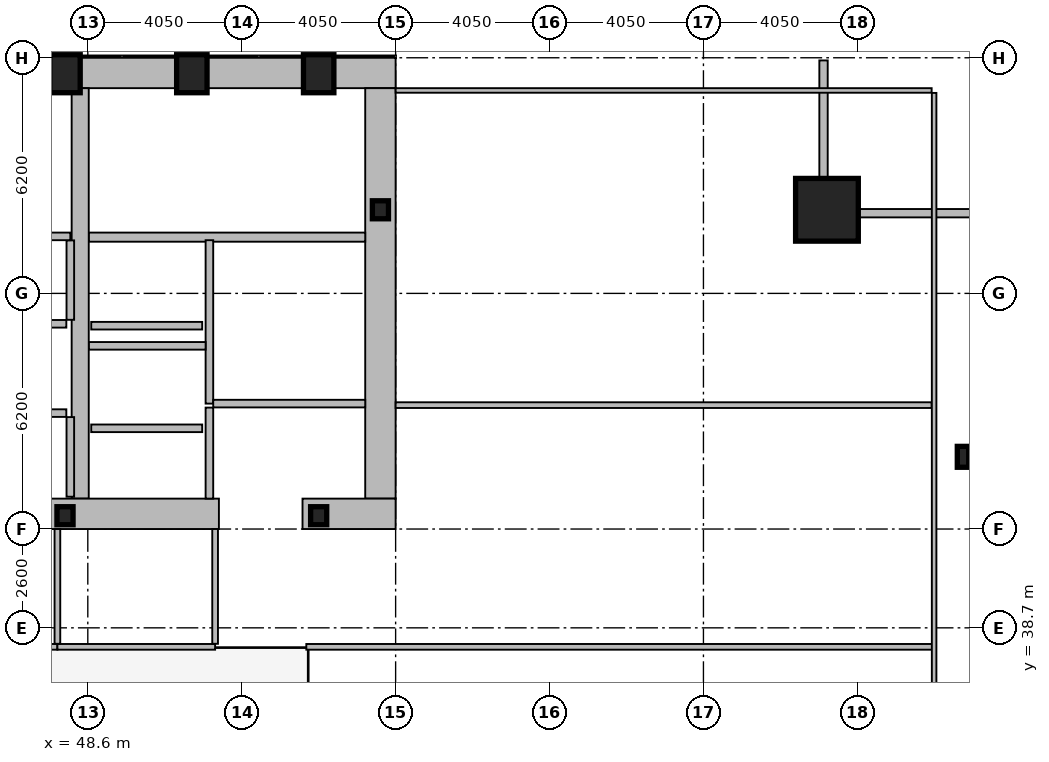
"""IFC4 building model, lengths in metres.
Left out: names, types, materials, properties, quantities, classifications, styles, units other than length and angle.
Written with IfcOpenShell. Run it as: python <this file> out.ifc"""

import sys

from ifc_helpers import new_model, si_unit, direction, frame, frame_2d, origin, origin_2d, place, context, subcontext, project, spatial, rectangle, hollow_rectangle, i_section, extrude, element, fill, save


model = new_model("IFC4")
c1 = context("Model", 3, precision=1e-05, world=origin(), true_north=direction((0.0, 1.0)))
c2 = subcontext(c1, "Body", "Model", "MODEL_VIEW")
j1 = project(units=[si_unit("LENGTHUNIT", "METRE"), si_unit("PLANEANGLEUNIT", "RADIAN")], contexts=[c1])
p1 = place(None, origin())
s1 = spatial("IfcSite", under=j1, at=p1, CompositionType="ELEMENT")
p2 = place(p1, origin())
s2 = spatial("IfcBuilding", under=s1, at=p2, CompositionType="ELEMENT")
p3 = place(p2, frame((0.0, 0.0, 61.8)))
s3 = spatial("IfcBuildingStorey", under=s2, at=p3, CompositionType="ELEMENT", Elevation=61.8)
p4 = place(p3, frame((16.2, 53.3, 0.0), z_axis=(0.0, 0.0, 1.0), x_axis=(1.0, 0.0, 0.0)))
e1 = element("IfcWall", 1, at=p4, inside=s3, PredefinedType="SHEAR", context=c2, shape_type="SweptSolid", body=[
    extrude(rectangle(XDim=40.5, YDim=0.8, at=frame_2d((20.25, 0.0))), origin(), (0.0, 0.0, 1.0), 3.82),
])
p5 = place(p3, frame((56.3, 52.9, 0.0), z_axis=(0.0, 0.0, 1.0), x_axis=(0.0, -1.0, 0.0)))
e2 = element("IfcWall", 2, at=p5, inside=s3, PredefinedType="SHEAR", context=c2, shape_type="SweptSolid", body=[
    extrude(rectangle(XDim=10.8, YDim=0.8, at=frame_2d((5.4, 0.0))), origin(), (0.0, 0.0, 1.0), 3.82),
])
p6 = place(p3, frame((48.4, 42.1, 0.0), z_axis=(0.0, 0.0, 1.0), x_axis=(0.0, 1.0, 0.0)))
e3 = element("IfcWall", 3, at=p6, inside=s3, PredefinedType="SHEAR", context=c2, shape_type="SweptSolid", body=[
    extrude(rectangle(XDim=10.8, YDim=0.45, at=frame_2d((5.4, 0.0))), origin(), (0.0, 0.0, 1.0), 3.82),
])
p7 = place(p3, frame((52.05, 41.7, 0.0), z_axis=(0.0, 0.0, 1.0), x_axis=(-1.0, 0.0, 0.0)))
e4 = element("IfcWall", 4, at=p7, inside=s3, PredefinedType="SHEAR", context=c2, shape_type="SweptSolid", body=[
    extrude(rectangle(XDim=11.3, YDim=0.8, at=frame_2d((5.65, 0.0))), origin(), (0.0, 0.0, 1.0), 3.82),
])
p8 = place(p3, frame((56.7, 41.7, 0.0), z_axis=(0.0, 0.0, 1.0), x_axis=(-1.0, 0.0, 0.0)))
e5 = element("IfcWall", 5, at=p8, inside=s3, PredefinedType="SHEAR", context=c2, shape_type="SweptSolid", body=[
    extrude(rectangle(XDim=2.45, YDim=0.8, at=frame_2d((1.225, 0.0))), origin(), (0.0, 0.0, 1.0), 3.82),
])
p9 = place(p3, frame((48.63, 48.98, 0.0), z_axis=(0.0, 0.0, 1.0), x_axis=(1.0, 0.0, 0.0)))
e6 = element("IfcWall", 6, at=p9, inside=s3, PredefinedType="SHEAR", context=c2, shape_type="SweptSolid", body=[
    extrude(rectangle(XDim=7.27, YDim=0.24, at=frame_2d((3.635, 0.0))), origin(), (0.0, 0.0, 1.0), 3.82),
])
p10 = place(p9, frame((6.0, 0.0, 0.0)))
e7 = element("IfcOpeningElement", 7, at=p10, cuts=e6, PredefinedType="OPENING", context=c2, shape_type="SweptSolid", body=[
    extrude(rectangle(XDim=1.05, YDim=2.15, at=frame_2d((0.525, 1.075))), frame((0.0, 0.13, 0.0), z_axis=(0.0, -1.0, 0.0), x_axis=(1.0, 0.0, 0.0)), (0.0, 0.0, 1.0), 0.26),
])
p11 = place(p3, frame((68.05, 49.7, 0.0), z_axis=(0.0, 0.0, 1.0), x_axis=(1.0, 0.0, 0.0)))
e8 = element("IfcColumn", 8, at=p11, inside=s3, PredefinedType="COLUMN", context=c2, shape_type="SweptSolid", body=[
    extrude(hollow_rectangle(XDim=1.65, YDim=1.65, WallThickness=0.075, at=origin_2d()), origin(), (0.0, 0.0, 1.0), 4.0),
])
for number, where, z_axis, x_axis in (
    (9, (48.0, 53.28, 0.0), (0.0, 0.0, 1.0), (1.0, 0.0, 0.0)),
    (10, (51.337, 53.28, 0.0), (0.0, 0.0, 1.0), (1.0, 0.0, 0.0)),
    (11, (54.675, 53.28, 0.0), (0.0, 0.0, 1.0), (1.0, 0.0, 0.0)),
):
    element("IfcColumn", number, at=place(p3, frame(where, z_axis=z_axis, x_axis=x_axis)), inside=s3, PredefinedType="COLUMN", context=c2, shape_type="SweptSolid", body=[
        extrude(hollow_rectangle(XDim=0.8, YDim=1.0, WallThickness=0.055, at=origin_2d()), origin(), (0.0, 0.0, 1.0), 4.0),
    ])
p12 = place(p3, frame((71.63, 43.2, 0.0), z_axis=(0.0, 0.0, 1.0), x_axis=(1.0, 0.0, 0.0)))
e12 = element("IfcColumn", 12, at=p12, inside=s3, PredefinedType="COLUMN", context=c2, shape_type="SweptSolid", body=[
    extrude(i_section(OverallWidth=0.3, OverallDepth=0.55, WebThickness=0.015, FlangeThickness=0.029, at=origin_2d()), origin(), (0.0, 0.0, 1.0), 4.0),
])
for number, where, z_axis, x_axis in (
    (13, (56.3, 49.7, 0.0), (0.0, 0.0, 1.0), (1.0, 0.0, 0.0)),
    (14, (48.0, 41.65, 0.0), (0.0, 0.0, 1.0), (1.0, 0.0, 0.0)),
    (15, (54.675, 41.65, 0.0), (0.0, 0.0, 1.0), (1.0, 0.0, 0.0)),
):
    element("IfcColumn", number, at=place(p3, frame(where, z_axis=z_axis, x_axis=x_axis)), inside=s3, PredefinedType="COLUMN", context=c2, shape_type="SweptSolid", body=[
        extrude(i_section(OverallWidth=0.424, OverallDepth=0.474, WebThickness=0.048, FlangeThickness=0.077, at=origin_2d()), origin(), (0.0, 0.0, 1.0), 4.0),
    ])
p13 = place(p3, frame((67.96, 53.63, 0.0), z_axis=(0.0, 0.0, 1.0), x_axis=(0.0, -1.0, 0.0)))
e16 = element("IfcWall", 16, at=p13, inside=s3, PredefinedType="SOLIDWALL", context=c2, shape_type="SweptSolid", body=[
    extrude(rectangle(XDim=3.91, YDim=0.22, at=frame_2d((1.955, 0.0))), origin(), (0.0, 0.0, 1.0), 3.16),
])
p14 = place(p3, frame((67.85, 49.61, 0.0), z_axis=(0.0, 0.0, 1.0), x_axis=(1.0, 0.0, 0.0)))
e17 = element("IfcWall", 17, at=p14, inside=s3, PredefinedType="SOLIDWALL", context=c2, shape_type="SweptSolid", body=[
    extrude(rectangle(XDim=4.22, YDim=0.22, at=frame_2d((2.11, 0.0))), origin(), (0.0, 0.0, 1.0), 3.16),
])
p15 = place(p3, frame((51.61, 43.95, 0.0), z_axis=(0.0, 0.0, 1.0), x_axis=(-1.0, 0.0, 0.0)))
e18 = element("IfcWall", 18, at=p15, inside=s3, PredefinedType="PARTITIONING", context=c2, shape_type="SweptSolid", body=[
    extrude(rectangle(XDim=2.92, YDim=0.2, at=frame_2d((1.46, 0.0))), origin(), (0.0, 0.0, 1.0), 3.82),
])
p16 = place(p15, frame((0.81, 0.0, 0.0)))
e19 = element("IfcOpeningElement", 19, at=p16, cuts=e18, PredefinedType="OPENING", context=c2, shape_type="SweptSolid", body=[
    extrude(rectangle(XDim=1.3, YDim=2.18, at=frame_2d((0.65, 1.09))), frame((0.0, 0.11, 0.0), z_axis=(0.0, -1.0, 0.0), x_axis=(1.0, 0.0, 0.0)), (0.0, 0.0, 1.0), 0.22),
])
p17 = place(p3, frame((51.61, 46.65, 0.0), z_axis=(0.0, 0.0, 1.0), x_axis=(-1.0, 0.0, 0.0)))
e20 = element("IfcWall", 20, at=p17, inside=s3, PredefinedType="PARTITIONING", context=c2, shape_type="SweptSolid", body=[
    extrude(rectangle(XDim=2.92, YDim=0.2, at=frame_2d((1.46, 0.0))), origin(), (0.0, 0.0, 1.0), 3.82),
])
p18 = place(p17, frame((0.86, 0.0, 0.0)))
e21 = element("IfcOpeningElement", 21, at=p18, cuts=e20, PredefinedType="OPENING", context=c2, shape_type="SweptSolid", body=[
    extrude(rectangle(XDim=1.2, YDim=2.18, at=frame_2d((0.6, 1.09))), frame((0.0, 0.11, 0.0), z_axis=(0.0, -1.0, 0.0), x_axis=(1.0, 0.0, 0.0)), (0.0, 0.0, 1.0), 0.22),
])
p19 = place(p3, frame((51.8, 44.6, 0.0), z_axis=(0.0, 0.0, 1.0), x_axis=(0.0, 1.0, 0.0)))
e22 = element("IfcWall", 22, at=p19, inside=s3, PredefinedType="PARTITIONING", context=c2, shape_type="SweptSolid", body=[
    extrude(rectangle(XDim=4.3, YDim=0.2, at=frame_2d((2.15, 0.0))), origin(), (0.0, 0.0, 1.0), 3.82),
])
p20 = place(p3, frame((51.9, 44.6, 0.0), z_axis=(0.0, 0.0, 1.0), x_axis=(1.0, 0.0, 0.0)))
e23 = element("IfcWall", 23, at=p20, inside=s3, PredefinedType="PARTITIONING", context=c2, shape_type="SweptSolid", body=[
    extrude(rectangle(XDim=4.0, YDim=0.2, at=frame_2d((2.0, 0.0))), origin(), (0.0, 0.0, 1.0), 3.82),
])
p21 = place(p20, frame((1.15, 0.0, 0.0)))
e24 = element("IfcOpeningElement", 24, at=p21, cuts=e23, PredefinedType="OPENING", context=c2, shape_type="SweptSolid", body=[
    extrude(rectangle(XDim=1.05, YDim=2.15, at=frame_2d((0.525, 1.075))), frame((0.0, 0.11, 0.0), z_axis=(0.0, -1.0, 0.0), x_axis=(1.0, 0.0, 0.0)), (0.0, 0.0, 1.0), 0.22),
])
p22 = place(p3, frame((48.63, 46.12, 0.0), z_axis=(0.0, 0.0, 1.0), x_axis=(1.0, 0.0, 0.0)))
e25 = element("IfcWall", 25, at=p22, inside=s3, PredefinedType="PARTITIONING", context=c2, shape_type="SweptSolid", body=[
    extrude(rectangle(XDim=3.07, YDim=0.2, at=frame_2d((1.535, 0.0))), origin(), (0.0, 0.0, 1.0), 3.82),
])
p23 = place(p3, frame((51.8, 42.1, 0.0), z_axis=(0.0, 0.0, 1.0), x_axis=(0.0, 1.0, 0.0)))
e26 = element("IfcWall", 26, at=p23, inside=s3, PredefinedType="PARTITIONING", context=c2, shape_type="SweptSolid", body=[
    extrude(rectangle(XDim=2.395, YDim=0.2, at=frame_2d((1.198, 0.0))), origin(), (0.0, 0.0, 1.0), 3.82),
])
p24 = place(p23, frame((0.38, 0.0, 0.0)))
e27 = element("IfcOpeningElement", 27, at=p24, cuts=e26, PredefinedType="OPENING", context=c2, shape_type="SweptSolid", body=[
    extrude(rectangle(XDim=1.05, YDim=2.15, at=frame_2d((0.525, 1.075))), frame((0.0, 0.11, 0.0), z_axis=(0.0, -1.0, 0.0), x_axis=(1.0, 0.0, 0.0)), (0.0, 0.0, 1.0), 0.22),
])
p25 = place(p3, frame((41.825, 46.7, 0.0), z_axis=(0.0, 0.0, 1.0), x_axis=(1.0, 0.0, 0.0)))
e28 = element("IfcWall", 28, at=p25, inside=s3, PredefinedType="PARTITIONING", context=c2, shape_type="SweptSolid", body=[
    extrude(rectangle(XDim=6.21, YDim=0.2, at=frame_2d((3.105, 0.0))), origin(), (0.0, 0.0, 1.0), 3.82),
])
p26 = place(p3, frame((48.14, 46.805, 0.0), z_axis=(0.0, 0.0, 1.0), x_axis=(0.0, 1.0, 0.0)))
e29 = element("IfcWall", 29, at=p26, inside=s3, PredefinedType="PARTITIONING", context=c2, shape_type="SweptSolid", body=[
    extrude(rectangle(XDim=2.09, YDim=0.2, at=frame_2d((1.045, 0.0))), origin(), (0.0, 0.0, 1.0), 3.82),
])
p27 = place(p3, frame((41.825, 44.35, 0.0), z_axis=(0.0, 0.0, 1.0), x_axis=(1.0, 0.0, 0.0)))
e30 = element("IfcWall", 30, at=p27, inside=s3, PredefinedType="PARTITIONING", context=c2, shape_type="SweptSolid", body=[
    extrude(rectangle(XDim=6.21, YDim=0.2, at=frame_2d((3.105, 0.0))), origin(), (0.0, 0.0, 1.0), 3.82),
])
p28 = place(p3, frame((48.14, 42.15, 0.0), z_axis=(0.0, 0.0, 1.0), x_axis=(0.0, 1.0, 0.0)))
e31 = element("IfcWall", 31, at=p28, inside=s3, PredefinedType="PARTITIONING", context=c2, shape_type="SweptSolid", body=[
    extrude(rectangle(XDim=2.095, YDim=0.2, at=frame_2d((1.048, 0.0))), origin(), (0.0, 0.0, 1.0), 3.82),
])
p29 = place(p3, frame((40.58, 52.86, 0.0), z_axis=(0.0, 0.0, 1.0), x_axis=(1.0, 0.0, 0.0)))
e32 = element("IfcWall", 32, at=p29, inside=s3, PredefinedType="PARTITIONING", context=c2, shape_type="SweptSolid", body=[
    extrude(rectangle(XDim=7.56, YDim=0.12, at=frame_2d((3.78, 0.0))), origin(), (0.0, 0.0, 1.0), 3.82),
])
p30 = place(p3, frame((40.58, 49.0, 0.0), z_axis=(0.0, 0.0, 1.0), x_axis=(1.0, 0.0, 0.0)))
e33 = element("IfcWall", 33, at=p30, inside=s3, PredefinedType="PARTITIONING", context=c2, shape_type="SweptSolid", body=[
    extrude(rectangle(XDim=7.56, YDim=0.2, at=frame_2d((3.78, 0.0))), origin(), (0.0, 0.0, 1.0), 3.82),
])
p31 = place(p30, frame((0.16, 0.0, 0.0)))
e34 = element("IfcOpeningElement", 34, at=p31, cuts=e33, PredefinedType="OPENING", context=c2, shape_type="SweptSolid", body=[
    extrude(rectangle(XDim=0.95, YDim=2.1, at=frame_2d((0.475, 1.05))), frame((0.0, 0.11, 0.0), z_axis=(0.0, -1.0, 0.0), x_axis=(1.0, 0.0, 0.0)), (0.0, 0.0, 1.0), 0.22),
])
p32 = place(p3, frame((40.88, 38.2, 0.0), z_axis=(0.0, 0.0, 1.0), x_axis=(1.0, 0.0, 0.0)))
e35 = element("IfcWall", 35, at=p32, inside=s3, PredefinedType="PARTITIONING", context=c2, shape_type="SweptSolid", body=[
    extrude(rectangle(XDim=6.92, YDim=0.15, at=frame_2d((3.46, 0.0))), origin(), (0.0, 0.0, 1.0), 3.01),
])
p33 = place(p32, frame((1.1, 0.0, 0.0)))
e36 = element("IfcOpeningElement", 36, at=p33, cuts=e35, PredefinedType="OPENING", context=c2, shape_type="SweptSolid", body=[
    extrude(rectangle(XDim=0.9, YDim=2.05, at=frame_2d((0.45, 1.025))), frame((0.0, 0.085, 0.0), z_axis=(0.0, -1.0, 0.0), x_axis=(1.0, 0.0, 0.0)), (0.0, 0.0, 1.0), 0.17),
])
p34 = place(p3, frame((47.8, 38.2, 0.0), z_axis=(0.0, 0.0, 1.0), x_axis=(1.0, 0.0, 0.0)))
e37 = element("IfcWall", 37, at=p34, inside=s3, PredefinedType="PARTITIONING", context=c2, shape_type="SweptSolid", body=[
    extrude(rectangle(XDim=4.15, YDim=0.15, at=frame_2d((2.075, 0.0))), origin(), (0.0, 0.0, 1.0), 3.01),
])
p35 = place(p34, frame((1.1, 0.0, 0.0)))
e38 = element("IfcOpeningElement", 38, at=p35, cuts=e37, PredefinedType="OPENING", context=c2, shape_type="SweptSolid", body=[
    extrude(rectangle(XDim=1.0, YDim=2.05, at=frame_2d((0.5, 1.025))), frame((0.0, 0.085, 0.0), z_axis=(0.0, -1.0, 0.0), x_axis=(1.0, 0.0, 0.0)), (0.0, 0.0, 1.0), 0.17),
])
p36 = place(p3, frame((47.8, 38.28, 0.0), z_axis=(0.0, 0.0, 1.0), x_axis=(0.0, 1.0, 0.0)))
e39 = element("IfcWall", 39, at=p36, inside=s3, PredefinedType="PARTITIONING", context=c2, shape_type="SweptSolid", body=[
    extrude(rectangle(XDim=3.02, YDim=0.15, at=frame_2d((1.51, 0.0))), origin(), (0.0, 0.0, 1.0), 3.01),
])
p37 = place(p3, frame((51.95, 38.28, 0.0), z_axis=(0.0, 0.0, 1.0), x_axis=(0.0, 1.0, 0.0)))
e40 = element("IfcWall", 40, at=p37, inside=s3, PredefinedType="PARTITIONING", context=c2, shape_type="SweptSolid", body=[
    extrude(rectangle(XDim=3.02, YDim=0.15, at=frame_2d((1.51, 0.0))), origin(), (0.0, 0.0, 1.0), 3.82),
])
p38 = place(p3, frame((54.35, 38.2, 0.0), z_axis=(0.0, 0.0, 1.0), x_axis=(1.0, 0.0, 0.0)))
e41 = element("IfcWall", 41, at=p38, inside=s3, PredefinedType="PARTITIONING", context=c2, shape_type="SweptSolid", body=[
    extrude(rectangle(XDim=16.52, YDim=0.15, at=frame_2d((8.26, 0.0))), origin(), (0.0, 0.0, 1.0), 3.01),
])
p39 = place(p38, frame((3.25, 0.0, 0.0)))
e42 = element("IfcOpeningElement", 42, at=p39, cuts=e41, PredefinedType="OPENING", context=c2, shape_type="SweptSolid", body=[
    extrude(rectangle(XDim=0.95, YDim=2.05, at=frame_2d((0.475, 1.025))), frame((0.0, 0.085, 0.0), z_axis=(0.0, -1.0, 0.0), x_axis=(1.0, 0.0, 0.0)), (0.0, 0.0, 1.0), 0.17),
])
p40 = place(p3, frame((56.7, 44.56, 0.0), z_axis=(0.0, 0.0, 1.0), x_axis=(1.0, 0.0, 0.0)))
e43 = element("IfcWall", 43, at=p40, inside=s3, PredefinedType="PARTITIONING", context=c2, shape_type="SweptSolid", body=[
    extrude(rectangle(XDim=14.105, YDim=0.15, at=frame_2d((7.052, 0.0))), origin(), (0.0, 0.0, 1.0), 3.16),
])
p41 = place(p40, frame((0.9, 0.0, 0.0)))
e44 = element("IfcOpeningElement", 44, at=p41, cuts=e43, PredefinedType="OPENING", context=c2, shape_type="SweptSolid", body=[
    extrude(rectangle(XDim=0.9, YDim=2.05, at=frame_2d((0.45, 1.025))), frame((0.0, 0.085, 0.0), z_axis=(0.0, -1.0, 0.0), x_axis=(1.0, 0.0, 0.0)), (0.0, 0.0, 1.0), 0.17),
])
p42 = place(p3, frame((70.87, 10.665, 0.0), z_axis=(0.0, 0.0, 1.0), x_axis=(0.0, 1.0, 0.0)))
e45 = element("IfcWall", 45, at=p42, inside=s3, PredefinedType="PARTITIONING", context=c2, shape_type="SweptSolid", body=[
    extrude(rectangle(XDim=42.11, YDim=0.12, at=frame_2d((21.055, 0.0))), origin(), (0.0, 0.0, 1.0), 3.01),
])
p43 = place(p3, frame((56.7, 52.84, 0.0), z_axis=(0.0, 0.0, 1.0), x_axis=(1.0, 0.0, 0.0)))
e46 = element("IfcWall", 46, at=p43, inside=s3, PredefinedType="PARTITIONING", context=c2, shape_type="SweptSolid", body=[
    extrude(rectangle(XDim=14.105, YDim=0.12, at=frame_2d((7.052, 0.0))), origin(), (0.0, 0.0, 1.0), 3.82),
])
p44 = place(p10, origin())
e47 = element("IfcDoor", 47, at=p44, inside=s3, OperationType="SINGLE_SWING_RIGHT", PredefinedType="DOOR", context=c2, shape_type="SweptSolid", body=[
    extrude(rectangle(XDim=1.05, YDim=2.15, at=frame_2d((0.525, 1.075))), frame((0.0, 0.025, 0.0), z_axis=(0.0, -1.0, 0.0), x_axis=(1.0, 0.0, 0.0)), (0.0, 0.0, 1.0), 0.05),
])
fill(e7, e47)
p45 = place(p16, origin())
e48 = element("IfcDoor", 48, at=p45, inside=s3, OperationType="SLIDING_TO_LEFT", PredefinedType="DOOR", context=c2, shape_type="SweptSolid", body=[
    extrude(rectangle(XDim=1.3, YDim=2.18, at=frame_2d((0.65, 1.09))), frame((0.0, 0.025, 0.0), z_axis=(0.0, -1.0, 0.0), x_axis=(1.0, 0.0, 0.0)), (0.0, 0.0, 1.0), 0.05),
])
fill(e19, e48)
p46 = place(p18, origin())
e49 = element("IfcDoor", 49, at=p46, inside=s3, OperationType="SLIDING_TO_LEFT", PredefinedType="DOOR", context=c2, shape_type="SweptSolid", body=[
    extrude(rectangle(XDim=1.2, YDim=2.18, at=frame_2d((0.6, 1.09))), frame((0.0, 0.025, 0.0), z_axis=(0.0, -1.0, 0.0), x_axis=(1.0, 0.0, 0.0)), (0.0, 0.0, 1.0), 0.05),
])
fill(e21, e49)
p47 = place(p21, origin())
e50 = element("IfcDoor", 50, at=p47, inside=s3, OperationType="SINGLE_SWING_RIGHT", PredefinedType="DOOR", context=c2, shape_type="SweptSolid", body=[
    extrude(rectangle(XDim=1.05, YDim=2.15, at=frame_2d((0.525, 1.075))), frame((0.0, 0.025, 0.0), z_axis=(0.0, -1.0, 0.0), x_axis=(1.0, 0.0, 0.0)), (0.0, 0.0, 1.0), 0.05),
])
fill(e24, e50)
p48 = place(p24, origin())
e51 = element("IfcDoor", 51, at=p48, inside=s3, OperationType="SINGLE_SWING_LEFT", PredefinedType="DOOR", context=c2, shape_type="SweptSolid", body=[
    extrude(rectangle(XDim=1.05, YDim=2.15, at=frame_2d((0.525, 1.075))), frame((0.0, 0.025, 0.0), z_axis=(0.0, -1.0, 0.0), x_axis=(1.0, 0.0, 0.0)), (0.0, 0.0, 1.0), 0.05),
])
fill(e27, e51)
p49 = place(p35, origin())
e52 = element("IfcDoor", 52, at=p49, inside=s3, OperationType="SINGLE_SWING_RIGHT", PredefinedType="DOOR", context=c2, shape_type="SweptSolid", body=[
    extrude(rectangle(XDim=1.0, YDim=2.05, at=frame_2d((0.5, 1.025))), frame((0.0, 0.025, 0.0), z_axis=(0.0, -1.0, 0.0), x_axis=(1.0, 0.0, 0.0)), (0.0, 0.0, 1.0), 0.05),
])
fill(e38, e52)
p50 = place(p39, origin())
e53 = element("IfcDoor", 53, at=p50, inside=s3, OperationType="SINGLE_SWING_RIGHT", PredefinedType="DOOR", context=c2, shape_type="SweptSolid", body=[
    extrude(rectangle(XDim=0.95, YDim=2.05, at=frame_2d((0.475, 1.025))), frame((0.0, 0.025, 0.0), z_axis=(0.0, -1.0, 0.0), x_axis=(1.0, 0.0, 0.0)), (0.0, 0.0, 1.0), 0.05),
])
fill(e42, e53)
p51 = place(p41, origin())
e54 = element("IfcDoor", 54, at=p51, inside=s3, OperationType="SINGLE_SWING_RIGHT", PredefinedType="DOOR", context=c2, shape_type="SweptSolid", body=[
    extrude(rectangle(XDim=0.9, YDim=2.05, at=frame_2d((0.45, 1.025))), frame((0.0, 0.025, 0.0), z_axis=(0.0, -1.0, 0.0), x_axis=(1.0, 0.0, 0.0)), (0.0, 0.0, 1.0), 0.05),
])
fill(e44, e54)
save(model, sys.argv[1])
